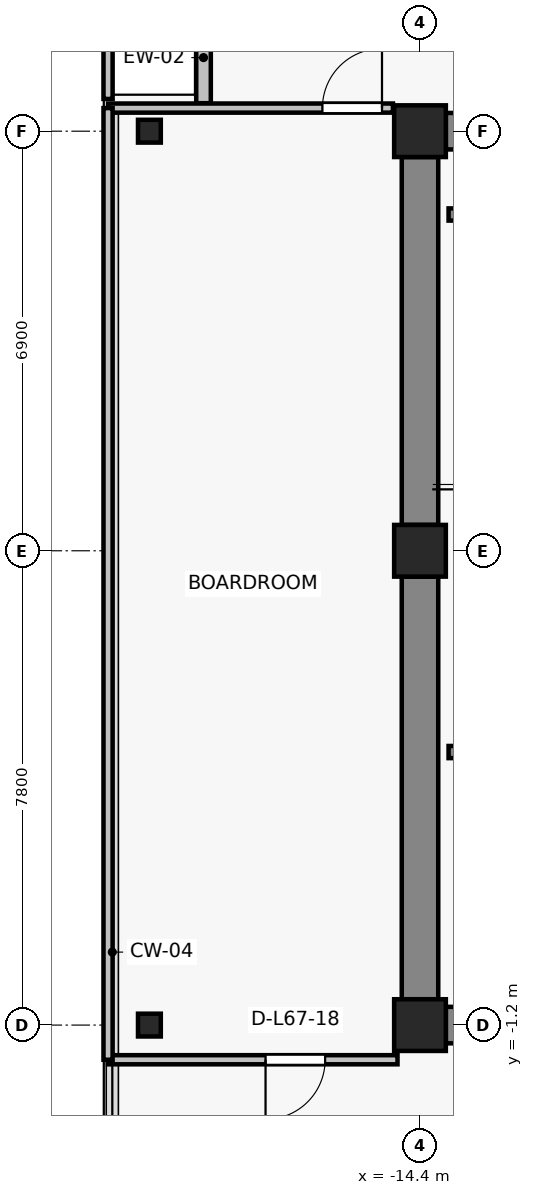
"""IFC4 building model, lengths in metres.
Left out: names, types, materials, properties, quantities, classifications, styles, units other than length and angle.
Written with IfcOpenShell. Run it as: python <this file> out.ifc"""

import sys

from ifc_helpers import new_model, si_unit, direction, frame, frame_2d, origin, origin_2d, place, context, subcontext, project, spatial, rectangle, i_section, extrude, source, transform, mapped, element, fill, save


model = new_model("IFC4")
c1 = context("Model", 3, precision=1e-05, world=origin(), true_north=direction((0.0, 1.0)))
c2 = subcontext(c1, "Body", "Model", "MODEL_VIEW")
j1 = project(units=[si_unit("LENGTHUNIT", "METRE"), si_unit("PLANEANGLEUNIT", "RADIAN")], contexts=[c1])
p1 = place(None, origin())
s1 = spatial("IfcSite", under=j1, at=p1, CompositionType="ELEMENT")
p2 = place(p1, origin())
s2 = spatial("IfcBuilding", under=s1, at=p2, CompositionType="ELEMENT")
p3 = place(p2, frame((0.0, 0.0, 238.6)))
s3 = spatial("IfcBuildingStorey", under=s2, at=p3, CompositionType="ELEMENT", Elevation=238.6)
for number, where, z_axis, x_axis in (
    (1, (-14.4, -1.2, 0.0), (0.0, 0.0, 1.0), (1.0, 0.0, 0.0)),
    (2, (-14.4, 6.6, 0.0), (0.0, 0.0, 1.0), (1.0, 0.0, 0.0)),
    (3, (-14.4, 13.5, 0.0), (0.0, 0.0, 1.0), (1.0, 0.0, 0.0)),
):
    element("IfcColumn", number, at=place(p3, frame(where, z_axis=z_axis, x_axis=x_axis)), inside=s3, PredefinedType="COLUMN", context=c2, shape_type="SweptSolid", body=[
        extrude(rectangle(XDim=0.85, YDim=0.85, at=origin_2d()), origin(), (0.0, 0.0, 1.0), 3.3),
    ])
for number, where, z_axis, x_axis in (
    (4, (-18.85, -1.2, 0.0), (0.0, 0.0, 1.0), (1.0, 0.0, 0.0)),
    (5, (-18.85, 13.5, 0.0), (0.0, 0.0, 1.0), (1.0, 0.0, 0.0)),
):
    element("IfcColumn", number, at=place(p3, frame(where, z_axis=z_axis, x_axis=x_axis)), inside=s3, PredefinedType="COLUMN", context=c2, shape_type="SweptSolid", body=[
        extrude(i_section(OverallWidth=0.375, OverallDepth=0.375, WebThickness=0.017, FlangeThickness=0.027, FilletRadius=0.015, at=origin_2d()), origin(), (0.0, 0.0, 1.0), 3.3),
    ])
p4 = place(p3, frame((-13.975, 13.5, 0.0), z_axis=(0.0, 0.0, 1.0), x_axis=(1.0, 0.0, 0.0)))
e6 = element("IfcWall", 6, at=p4, inside=s3, PredefinedType="SHEAR", context=c2, shape_type="SweptSolid", body=[
    extrude(rectangle(XDim=6.35, YDim=0.6, at=frame_2d((3.175, 0.0))), origin(), (0.0, 0.0, 1.0), 3.075),
])
p5 = place(p3, frame((-14.4, -0.775, 0.0), z_axis=(0.0, 0.0, 1.0), x_axis=(0.0, 1.0, 0.0)))
e7 = element("IfcWall", 7, at=p5, inside=s3, PredefinedType="SHEAR", context=c2, shape_type="SweptSolid", body=[
    extrude(rectangle(XDim=6.95, YDim=0.6, at=frame_2d((3.475, 0.0))), origin(), (0.0, 0.0, 1.0), 3.075),
])
p6 = place(p3, frame((-14.4, 7.025, 0.0), z_axis=(0.0, 0.0, 1.0), x_axis=(0.0, 1.0, 0.0)))
e8 = element("IfcWall", 8, at=p6, inside=s3, PredefinedType="SHEAR", context=c2, shape_type="SweptSolid", body=[
    extrude(rectangle(XDim=6.05, YDim=0.6, at=frame_2d((3.025, 0.0))), origin(), (0.0, 0.0, 1.0), 3.075),
])
p7 = place(p3, frame((-7.625, -1.2, 0.0), z_axis=(0.0, 0.0, 1.0), x_axis=(-1.0, 0.0, 0.0)))
e9 = element("IfcWall", 9, at=p7, inside=s3, PredefinedType="SHEAR", context=c2, shape_type="SweptSolid", body=[
    extrude(rectangle(XDim=6.35, YDim=0.6, at=frame_2d((3.175, 0.0))), origin(), (0.0, 0.0, 1.0), 3.075),
])
p8 = place(p7, frame((2.7, 0.0, 0.0)))
e10 = element("IfcOpeningElement", 10, at=p8, cuts=e9, PredefinedType="OPENING", context=c2, shape_type="SweptSolid", body=[
    extrude(rectangle(XDim=1.15, YDim=2.15, at=frame_2d((0.575, 1.075))), frame((0.0, 0.31, 0.0), z_axis=(0.0, -1.0, 0.0), x_axis=(1.0, 0.0, 0.0)), (0.0, 0.0, 1.0), 0.62),
])
p9 = place(p3, frame((-17.96, 15.46, 0.0), z_axis=(0.0, 0.0, 1.0), x_axis=(0.0, -1.0, 0.0)))
e11 = element("IfcWall", 11, at=p9, inside=s3, PredefinedType="SOLIDWALL", context=c2, shape_type="SweptSolid", body=[
    extrude(rectangle(XDim=1.5, YDim=0.24, at=frame_2d((0.75, 0.0))), origin(), (0.0, 0.0, 1.0), 3.075),
])
p10 = place(p3, frame((-10.41, 3.29, 0.0), z_axis=(0.0, 0.0, 1.0), x_axis=(-1.0, 0.0, 0.0)))
e12 = element("IfcWall", 12, at=p10, inside=s3, PredefinedType="SOLIDWALL", context=c2, shape_type="SweptSolid", body=[
    extrude(rectangle(XDim=3.52, YDim=0.2, at=frame_2d((1.76, 0.0))), origin(), (0.0, 0.0, 1.0), 3.075),
])
p11 = place(p10, frame((1.165, 0.0, 0.0)))
e13 = element("IfcOpeningElement", 13, at=p11, cuts=e12, PredefinedType="OPENING", context=c2, shape_type="SweptSolid", body=[
    extrude(rectangle(XDim=1.15, YDim=2.15, at=frame_2d((0.575, 1.075))), frame((0.0, 0.11, 0.0), z_axis=(0.0, -1.0, 0.0), x_axis=(1.0, 0.0, 0.0)), (0.0, 0.0, 1.0), 0.22),
])
p12 = place(p3, frame((-13.93, 12.13, 0.0), z_axis=(0.0, 0.0, 1.0), x_axis=(1.0, 0.0, 0.0)))
e14 = element("IfcWall", 14, at=p12, inside=s3, PredefinedType="SOLIDWALL", context=c2, shape_type="SweptSolid", body=[
    extrude(rectangle(XDim=3.52, YDim=0.2, at=frame_2d((1.76, 0.0))), origin(), (0.0, 0.0, 1.0), 3.075),
])
p13 = place(p3, frame((-14.77, -1.77, 0.0), z_axis=(0.0, 0.0, 1.0), x_axis=(-1.0, 0.0, 0.0)))
e15 = element("IfcWall", 15, at=p13, inside=s3, PredefinedType="PARTITIONING", context=c2, shape_type="SweptSolid", body=[
    extrude(rectangle(XDim=4.76, YDim=0.15, at=frame_2d((2.38, 0.0))), origin(), (0.0, 0.0, 1.0), 2.765),
])
p14 = place(p13, frame((1.19, 0.0, 0.0)))
e16 = element("IfcOpeningElement", 16, at=p14, cuts=e15, PredefinedType="OPENING", context=c2, shape_type="SweptSolid", body=[
    extrude(rectangle(XDim=0.98, YDim=2.15, at=frame_2d((0.49, 1.075))), frame((0.0, 0.085, 0.0), z_axis=(0.0, -1.0, 0.0), x_axis=(1.0, 0.0, 0.0)), (0.0, 0.0, 1.0), 0.17),
])
p15 = place(p3, frame((-19.53, 13.88, 0.0), z_axis=(0.0, 0.0, 1.0), x_axis=(1.0, 0.0, 0.0)))
e17 = element("IfcWall", 17, at=p15, inside=s3, PredefinedType="PARTITIONING", context=c2, shape_type="SweptSolid", body=[
    extrude(rectangle(XDim=4.685, YDim=0.15, at=frame_2d((2.343, 0.0))), origin(), (0.0, 0.0, 1.0), 3.075),
])
p16 = place(p15, frame((3.525, 0.0, 0.0)))
e18 = element("IfcOpeningElement", 18, at=p16, cuts=e17, PredefinedType="OPENING", context=c2, shape_type="SweptSolid", body=[
    extrude(rectangle(XDim=0.98, YDim=2.15, at=frame_2d((0.49, 1.075))), frame((0.0, 0.085, 0.0), z_axis=(0.0, -1.0, 0.0), x_axis=(1.0, 0.0, 0.0)), (0.0, 0.0, 1.0), 0.17),
])
p17 = place(p3, frame((-19.53, -1.77, 0.0), z_axis=(0.0, 0.0, 1.0), x_axis=(0.0, 1.0, 0.0)))
e19 = element("IfcWall", 19, at=p17, inside=s3, PredefinedType="PARTITIONING", context=c2, shape_type="SweptSolid", body=[
    extrude(rectangle(XDim=15.65, YDim=0.15, at=frame_2d((7.825, 0.0))), origin(), (0.0, 0.0, 1.0), 3.075),
])
p18 = place(p3, frame((-19.53, 14.03, 0.0), z_axis=(0.0, 0.0, 1.0), x_axis=(0.0, 1.0, 0.0)))
e20 = element("IfcWall", 20, at=p18, inside=s3, PredefinedType="PARTITIONING", context=c2, shape_type="SweptSolid", body=[
    extrude(rectangle(XDim=3.0, YDim=0.15, at=frame_2d((1.5, 0.0))), origin(), (0.0, 0.0, 1.0), 3.075),
])
m1 = source(origin(), c2, "Body", "SweptSolid", [
    extrude(rectangle(XDim=0.98, YDim=2.15, at=frame_2d((0.49, 1.075))), frame((0.0, 0.025, 0.0), z_axis=(0.0, -1.0, 0.0), x_axis=(1.0, 0.0, 0.0)), (0.0, 0.0, 1.0), 0.05),
])
p19 = place(p14, origin())
e21 = element("IfcDoor", 21, at=p19, inside=s3, OperationType="SINGLE_SWING_RIGHT", PredefinedType="DOOR", context=c2, shape_type="MappedRepresentation", body=[
    mapped(m1, transform((0.0, 0.0, 0.0), x_axis=(1.0, 0.0, 0.0), y_axis=(0.0, 1.0, 0.0), z_axis=(0.0, 0.0, 1.0), scale=1.0)),
])
fill(e16, e21)
p20 = place(p16, origin())
e22 = element("IfcDoor", 22, at=p20, inside=s3, OperationType="SINGLE_SWING_RIGHT", PredefinedType="DOOR", context=c2, shape_type="MappedRepresentation", body=[
    mapped(m1, transform((0.0, 0.0, 0.0), x_axis=(1.0, 0.0, 0.0), y_axis=(0.0, 1.0, 0.0), z_axis=(0.0, 0.0, 1.0), scale=1.0)),
])
fill(e18, e22)
save(model, sys.argv[1])
